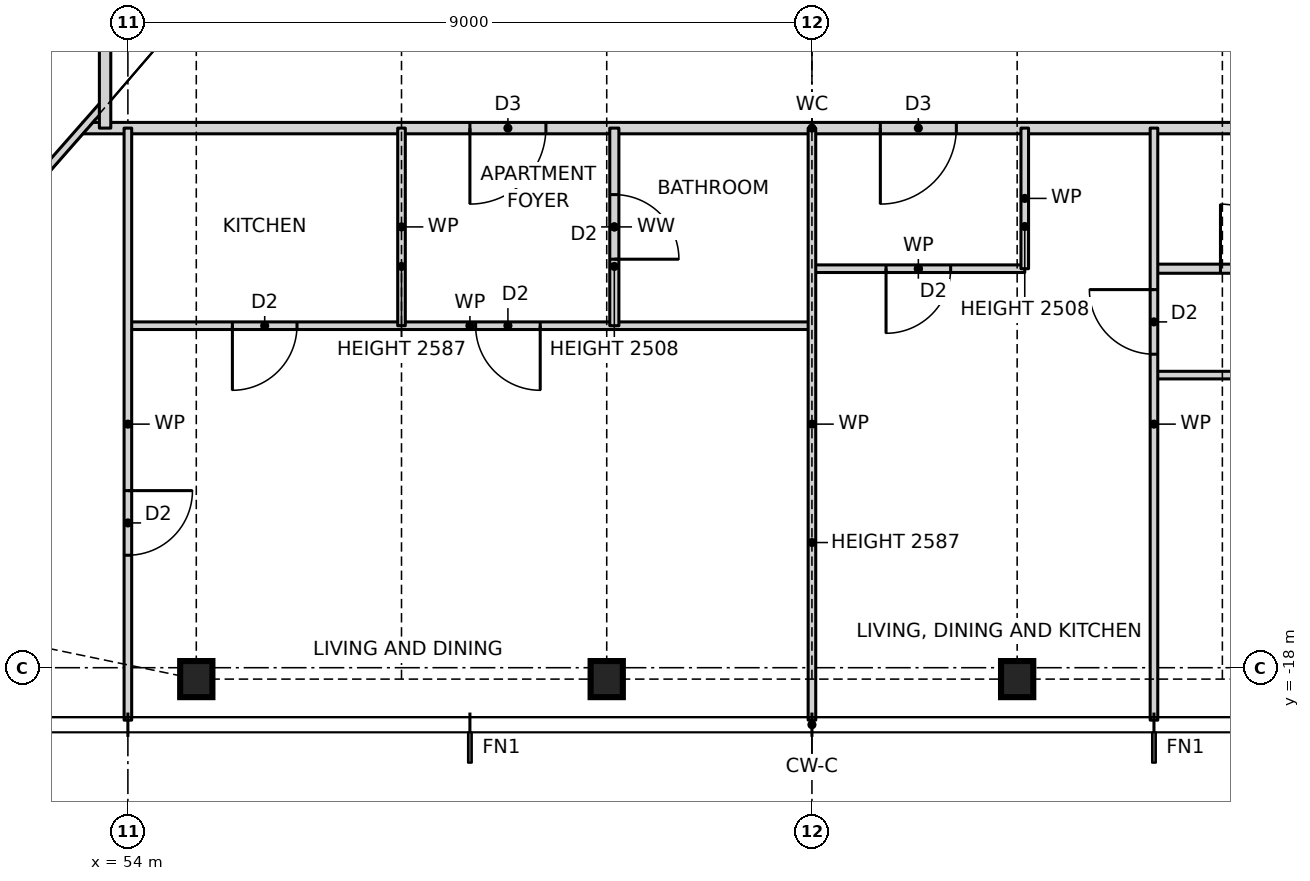
"""IFC4 building model, lengths in metres.
Left out: names, types, materials, properties, quantities, classifications, styles, units other than length and angle.
Written with IfcOpenShell. Run it as: python <this file> out.ifc"""

import sys

from ifc_helpers import new_model, si_unit, direction, frame, frame_2d, origin, origin_2d, place, context, subcontext, project, spatial, rectangle, i_section, extrude, element, fill, save


model = new_model("IFC4")
c1 = context("Model", 3, precision=1e-05, world=origin(), true_north=direction((0.0, 1.0)))
c2 = subcontext(c1, "Body", "Model", "MODEL_VIEW")
j1 = project(units=[si_unit("LENGTHUNIT", "METRE"), si_unit("PLANEANGLEUNIT", "RADIAN")], contexts=[c1])
p1 = place(None, origin())
s1 = spatial("IfcSite", under=j1, at=p1, CompositionType="ELEMENT")
p2 = place(p1, origin())
s2 = spatial("IfcBuilding", under=s1, at=p2, CompositionType="ELEMENT")
p3 = place(p2, frame((0.0, 0.0, 60.5)))
s3 = spatial("IfcBuildingStorey", under=s2, at=p3, CompositionType="ELEMENT", Elevation=60.5)
for number, where, z_axis, x_axis in (
    (1, (54.9, -18.15, 0.0), (0.0, 0.0, 1.0), (1.0, 0.0, 0.0)),
    (2, (60.3, -18.15, 0.0), (0.0, 0.0, 1.0), (1.0, 0.0, 0.0)),
    (3, (65.7, -18.15, 0.0), (0.0, 0.0, 1.0), (1.0, 0.0, 0.0)),
):
    element("IfcColumn", number, at=place(p3, frame(where, z_axis=z_axis, x_axis=x_axis)), inside=s3, PredefinedType="COLUMN", context=c2, shape_type="SweptSolid", body=[
        extrude(i_section(OverallWidth=0.424, OverallDepth=0.475, WebThickness=0.048, FlangeThickness=0.077, at=origin_2d()), origin(), (0.0, 0.0, 1.0), 3.5),
    ])
p4 = place(p3, frame((67.5, -14.15, 0.0), z_axis=(0.0, 0.0, 1.0), x_axis=(1.0, 0.0, 0.0)))
e4 = element("IfcWall", 4, at=p4, inside=s3, PredefinedType="PARTITIONING", context=c2, shape_type="SweptSolid", body=[
    extrude(rectangle(XDim=6.7, YDim=0.1, at=frame_2d((3.35, 0.0))), origin(), (0.0, 0.0, 1.0), 3.27),
])
p5 = place(p4, frame((1.825, 0.0, 0.0)))
e5 = element("IfcOpeningElement", 5, at=p5, cuts=e4, PredefinedType="OPENING", context=c2, shape_type="SweptSolid", body=[
    extrude(rectangle(XDim=0.85, YDim=2.1, at=frame_2d((0.425, 1.05))), frame((0.0, 0.06, 0.0), z_axis=(0.0, -1.0, 0.0), x_axis=(1.0, 0.0, 0.0)), (0.0, 0.0, 1.0), 0.12),
])
p6 = place(p4, frame((5.175, 0.0, 0.0)))
e6 = element("IfcOpeningElement", 6, at=p6, cuts=e4, PredefinedType="OPENING", context=c2, shape_type="SweptSolid", body=[
    extrude(rectangle(XDim=0.85, YDim=2.1, at=frame_2d((0.425, 1.05))), frame((0.0, 0.06, 0.0), z_axis=(0.0, -1.0, 0.0), x_axis=(1.0, 0.0, 0.0)), (0.0, 0.0, 1.0), 0.12),
])
p7 = place(p3, frame((54.0, -13.5, 0.0), z_axis=(0.0, 0.0, 1.0), x_axis=(1.0, 0.0, 0.0)))
e7 = element("IfcWall", 7, at=p7, inside=s3, PredefinedType="PARTITIONING", context=c2, shape_type="SweptSolid", body=[
    extrude(rectangle(XDim=9.0, YDim=0.1, at=frame_2d((4.5, 0.0))), origin(), (0.0, 0.0, 1.0), 3.27),
])
p8 = place(p7, frame((1.375, 0.0, 0.0)))
e8 = element("IfcOpeningElement", 8, at=p8, cuts=e7, PredefinedType="OPENING", context=c2, shape_type="SweptSolid", body=[
    extrude(rectangle(XDim=0.85, YDim=2.1, at=frame_2d((0.425, 1.05))), frame((0.0, 0.06, 0.0), z_axis=(0.0, -1.0, 0.0), x_axis=(1.0, 0.0, 0.0)), (0.0, 0.0, 1.0), 0.12),
])
p9 = place(p7, frame((4.575, 0.0, 0.0)))
e9 = element("IfcOpeningElement", 9, at=p9, cuts=e7, PredefinedType="OPENING", context=c2, shape_type="SweptSolid", body=[
    extrude(rectangle(XDim=0.85, YDim=2.1, at=frame_2d((0.425, 1.05))), frame((0.0, 0.06, 0.0), z_axis=(0.0, -1.0, 0.0), x_axis=(1.0, 0.0, 0.0)), (0.0, 0.0, 1.0), 0.12),
])
p10 = place(p3, frame((63.0, -12.75, 0.0), z_axis=(0.0, 0.0, 1.0), x_axis=(1.0, 0.0, 0.0)))
e10 = element("IfcWall", 10, at=p10, inside=s3, PredefinedType="PARTITIONING", context=c2, shape_type="SweptSolid", body=[
    extrude(rectangle(XDim=2.8, YDim=0.1, at=frame_2d((1.4, 0.0))), origin(), (0.0, 0.0, 1.0), 3.27),
])
p11 = place(p10, frame((0.975, 0.0, 0.0)))
e11 = element("IfcOpeningElement", 11, at=p11, cuts=e10, PredefinedType="OPENING", context=c2, shape_type="SweptSolid", body=[
    extrude(rectangle(XDim=0.85, YDim=2.1, at=frame_2d((0.425, 1.05))), frame((0.0, 0.06, 0.0), z_axis=(0.0, -1.0, 0.0), x_axis=(1.0, 0.0, 0.0)), (0.0, 0.0, 1.0), 0.12),
])
p12 = place(p3, frame((67.5, -12.75, 0.0), z_axis=(0.0, 0.0, 1.0), x_axis=(1.0, 0.0, 0.0)))
e12 = element("IfcWall", 12, at=p12, inside=s3, PredefinedType="PARTITIONING", context=c2, shape_type="SweptSolid", body=[
    extrude(rectangle(XDim=6.7, YDim=0.12, at=frame_2d((3.35, 0.0))), origin(), (0.0, 0.0, 1.0), 3.27),
])
p13 = place(p12, frame((0.875, 0.0, 0.0)))
e13 = element("IfcOpeningElement", 13, at=p13, cuts=e12, PredefinedType="OPENING", context=c2, shape_type="SweptSolid", body=[
    extrude(rectangle(XDim=0.85, YDim=2.1, at=frame_2d((0.425, 1.05))), frame((0.0, 0.07, 0.0), z_axis=(0.0, -1.0, 0.0), x_axis=(1.0, 0.0, 0.0)), (0.0, 0.0, 1.0), 0.14),
])
p14 = place(p12, frame((4.225, 0.0, 0.0)))
e14 = element("IfcOpeningElement", 14, at=p14, cuts=e12, PredefinedType="OPENING", context=c2, shape_type="SweptSolid", body=[
    extrude(rectangle(XDim=0.85, YDim=2.1, at=frame_2d((0.425, 1.05))), frame((0.0, 0.07, 0.0), z_axis=(0.0, -1.0, 0.0), x_axis=(1.0, 0.0, 0.0)), (0.0, 0.0, 1.0), 0.14),
])
p15 = place(p3, frame((53.408, -10.9, 0.0), z_axis=(0.0, 0.0, 1.0), x_axis=(1.0, 0.0, 0.0)))
e15 = element("IfcWall", 15, at=p15, inside=s3, PredefinedType="PARTITIONING", context=c2, shape_type="SweptSolid", body=[
    extrude(rectangle(XDim=19.184, YDim=0.15, at=frame_2d((9.592, 0.0))), origin(), (0.0, 0.0, 1.0), 3.27),
])
p16 = place(p15, frame((5.092, 0.0, 0.0)))
e16 = element("IfcOpeningElement", 16, at=p16, cuts=e15, PredefinedType="OPENING", context=c2, shape_type="SweptSolid", body=[
    extrude(rectangle(XDim=1.0, YDim=2.1, at=frame_2d((0.5, 1.05))), frame((0.0, 0.085, 0.0), z_axis=(0.0, -1.0, 0.0), x_axis=(1.0, 0.0, 0.0)), (0.0, 0.0, 1.0), 0.17),
])
p17 = place(p15, frame((10.492, 0.0, 0.0)))
e17 = element("IfcOpeningElement", 17, at=p17, cuts=e15, PredefinedType="OPENING", context=c2, shape_type="SweptSolid", body=[
    extrude(rectangle(XDim=1.0, YDim=2.1, at=frame_2d((0.5, 1.05))), frame((0.0, 0.085, 0.0), z_axis=(0.0, -1.0, 0.0), x_axis=(1.0, 0.0, 0.0)), (0.0, 0.0, 1.0), 0.17),
])
p18 = place(p3, frame((47.944, -17.109, 0.0), z_axis=(0.0, 0.0, 1.0), x_axis=(0.660612734851, 0.750726857487, 0.0)))
e18 = element("IfcWall", 18, at=p18, inside=s3, PredefinedType="PARTITIONING", context=c2, shape_type="SweptSolid", body=[
    extrude(rectangle(XDim=8.713, YDim=0.1, at=frame_2d((4.356, 0.0))), origin(), (0.0, 0.0, 1.0), 2.429),
])
p19 = place(p3, frame((67.5, -18.69, 0.0), z_axis=(0.0, 0.0, 1.0), x_axis=(0.0, 1.0, 0.0)))
e19 = element("IfcWall", 19, at=p19, inside=s3, PredefinedType="PARTITIONING", context=c2, shape_type="SweptSolid", body=[
    extrude(rectangle(XDim=7.79, YDim=0.1, at=frame_2d((3.895, 0.0))), origin(), (0.0, 0.0, 1.0), 3.27),
])
p20 = place(p19, frame((4.815, 0.0, 0.0)))
e20 = element("IfcOpeningElement", 20, at=p20, cuts=e19, PredefinedType="OPENING", context=c2, shape_type="SweptSolid", body=[
    extrude(rectangle(XDim=0.85, YDim=2.1, at=frame_2d((0.425, 1.05))), frame((0.0, 0.06, 0.0), z_axis=(0.0, -1.0, 0.0), x_axis=(1.0, 0.0, 0.0)), (0.0, 0.0, 1.0), 0.12),
])
p21 = place(p3, frame((65.8, -12.75, 0.0), z_axis=(0.0, 0.0, 1.0), x_axis=(0.0, 1.0, 0.0)))
e21 = element("IfcWall", 21, at=p21, inside=s3, PredefinedType="PARTITIONING", context=c2, shape_type="SweptSolid", body=[
    extrude(rectangle(XDim=1.85, YDim=0.1, at=frame_2d((0.925, 0.0))), origin(), (0.0, 0.0, 1.0), 2.508),
])
p22 = place(p3, frame((63.0, -18.69, 0.0), z_axis=(0.0, 0.0, 1.0), x_axis=(0.0, 1.0, 0.0)))
e22 = element("IfcWall", 22, at=p22, inside=s3, PredefinedType="PARTITIONING", context=c2, shape_type="SweptSolid", body=[
    extrude(rectangle(XDim=7.79, YDim=0.1, at=frame_2d((3.895, 0.0))), origin(), (0.0, 0.0, 1.0), 2.587),
])
p23 = place(p3, frame((60.4, -13.5, 0.0), z_axis=(0.0, 0.0, 1.0), x_axis=(0.0, 1.0, 0.0)))
e23 = element("IfcWall", 23, at=p23, inside=s3, PredefinedType="PARTITIONING", context=c2, shape_type="SweptSolid", body=[
    extrude(rectangle(XDim=2.6, YDim=0.12, at=frame_2d((1.3, 0.0))), origin(), (0.0, 0.0, 1.0), 2.508),
])
p24 = place(p23, frame((0.875, 0.0, 0.0)))
e24 = element("IfcOpeningElement", 24, at=p24, cuts=e23, PredefinedType="OPENING", context=c2, shape_type="SweptSolid", body=[
    extrude(rectangle(XDim=0.85, YDim=2.1, at=frame_2d((0.425, 1.05))), frame((0.0, 0.07, 0.0), z_axis=(0.0, -1.0, 0.0), x_axis=(1.0, 0.0, 0.0)), (0.0, 0.0, 1.0), 0.14),
])
p25 = place(p3, frame((57.6, -13.5, 0.0), z_axis=(0.0, 0.0, 1.0), x_axis=(0.0, 1.0, 0.0)))
e25 = element("IfcWall", 25, at=p25, inside=s3, PredefinedType="PARTITIONING", context=c2, shape_type="SweptSolid", body=[
    extrude(rectangle(XDim=2.6, YDim=0.1, at=frame_2d((1.3, 0.0))), origin(), (0.0, 0.0, 1.0), 2.587),
])
p26 = place(p3, frame((54.0, -18.69, 0.0), z_axis=(0.0, 0.0, 1.0), x_axis=(0.0, 1.0, 0.0)))
e26 = element("IfcWall", 26, at=p26, inside=s3, PredefinedType="PARTITIONING", context=c2, shape_type="SweptSolid", body=[
    extrude(rectangle(XDim=7.79, YDim=0.1, at=frame_2d((3.895, 0.0))), origin(), (0.0, 0.0, 1.0), 3.27),
])
p27 = place(p26, frame((2.17, 0.0, 0.0)))
e27 = element("IfcOpeningElement", 27, at=p27, cuts=e26, PredefinedType="OPENING", context=c2, shape_type="SweptSolid", body=[
    extrude(rectangle(XDim=0.85, YDim=2.1, at=frame_2d((0.425, 1.05))), frame((0.0, 0.06, 0.0), z_axis=(0.0, -1.0, 0.0), x_axis=(1.0, 0.0, 0.0)), (0.0, 0.0, 1.0), 0.12),
])
p28 = place(p3, frame((53.7, -10.9, 0.0), z_axis=(0.0, 0.0, 1.0), x_axis=(0.0, 1.0, 0.0)))
e28 = element("IfcWall", 28, at=p28, inside=s3, PredefinedType="PARTITIONING", context=c2, shape_type="SweptSolid", body=[
    extrude(rectangle(XDim=21.468, YDim=0.15, at=frame_2d((10.734, 0.0))), origin(), (0.0, 0.0, 1.0), 3.27),
])
p29 = place(p28, frame((16.65, 0.0, 0.0)))
e29 = element("IfcOpeningElement", 29, at=p29, cuts=e28, PredefinedType="OPENING", context=c2, shape_type="SweptSolid", body=[
    extrude(rectangle(XDim=1.0, YDim=2.1, at=frame_2d((0.5, 1.05))), frame((0.0, 0.085, 0.0), z_axis=(0.0, -1.0, 0.0), x_axis=(1.0, 0.0, 0.0)), (0.0, 0.0, 1.0), 0.17),
])
p30 = place(p28, frame((11.25, 0.0, 0.0)))
e30 = element("IfcOpeningElement", 30, at=p30, cuts=e28, PredefinedType="OPENING", context=c2, shape_type="SweptSolid", body=[
    extrude(rectangle(XDim=1.0, YDim=2.1, at=frame_2d((0.5, 1.05))), frame((0.0, 0.085, 0.0), z_axis=(0.0, -1.0, 0.0), x_axis=(1.0, 0.0, 0.0)), (0.0, 0.0, 1.0), 0.17),
])
p31 = place(p8, frame((0.85, 0.0, 0.0), z_axis=(0.0, 0.0, 1.0), x_axis=(-1.0, 0.0, 0.0)))
e31 = element("IfcDoor", 31, at=p31, inside=s3, OperationType="SINGLE_SWING_RIGHT", PredefinedType="DOOR", context=c2, shape_type="SweptSolid", body=[
    extrude(rectangle(XDim=0.85, YDim=2.1, at=frame_2d((0.425, 1.05))), frame((0.0, 0.025, 0.0), z_axis=(0.0, -1.0, 0.0), x_axis=(1.0, 0.0, 0.0)), (0.0, 0.0, 1.0), 0.05),
])
fill(e8, e31)
p32 = place(p16, frame((1.0, 0.0, 0.0), z_axis=(0.0, 0.0, 1.0), x_axis=(-1.0, 0.0, 0.0)))
e32 = element("IfcDoor", 32, at=p32, inside=s3, OperationType="SINGLE_SWING_RIGHT", PredefinedType="DOOR", context=c2, shape_type="SweptSolid", body=[
    extrude(rectangle(XDim=1.0, YDim=2.1, at=frame_2d((0.5, 1.05))), frame((0.0, 0.025, 0.0), z_axis=(0.0, -1.0, 0.0), x_axis=(1.0, 0.0, 0.0)), (0.0, 0.0, 1.0), 0.05),
])
fill(e16, e32)
p33 = place(p9, frame((0.85, 0.0, 0.0), z_axis=(0.0, 0.0, 1.0), x_axis=(-1.0, 0.0, 0.0)))
e33 = element("IfcDoor", 33, at=p33, inside=s3, OperationType="SINGLE_SWING_LEFT", PredefinedType="DOOR", context=c2, shape_type="SweptSolid", body=[
    extrude(rectangle(XDim=0.85, YDim=2.1, at=frame_2d((0.425, 1.05))), frame((0.0, 0.025, 0.0), z_axis=(0.0, -1.0, 0.0), x_axis=(1.0, 0.0, 0.0)), (0.0, 0.0, 1.0), 0.05),
])
fill(e9, e33)
p34 = place(p24, frame((0.85, 0.0, 0.0), z_axis=(0.0, 0.0, 1.0), x_axis=(-1.0, 0.0, 0.0)))
e34 = element("IfcDoor", 34, at=p34, inside=s3, OperationType="SINGLE_SWING_RIGHT", PredefinedType="DOOR", context=c2, shape_type="SweptSolid", body=[
    extrude(rectangle(XDim=0.85, YDim=2.1, at=frame_2d((0.425, 1.05))), frame((0.0, 0.025, 0.0), z_axis=(0.0, -1.0, 0.0), x_axis=(1.0, 0.0, 0.0)), (0.0, 0.0, 1.0), 0.05),
])
fill(e24, e34)
p35 = place(p27, frame((0.85, 0.0, 0.0), z_axis=(0.0, 0.0, 1.0), x_axis=(-1.0, 0.0, 0.0)))
e35 = element("IfcDoor", 35, at=p35, inside=s3, OperationType="SINGLE_SWING_LEFT", PredefinedType="DOOR", context=c2, shape_type="SweptSolid", body=[
    extrude(rectangle(XDim=0.85, YDim=2.1, at=frame_2d((0.425, 1.05))), frame((0.0, 0.025, 0.0), z_axis=(0.0, -1.0, 0.0), x_axis=(1.0, 0.0, 0.0)), (0.0, 0.0, 1.0), 0.05),
])
fill(e27, e35)
p36 = place(p17, frame((1.0, 0.0, 0.0), z_axis=(0.0, 0.0, 1.0), x_axis=(-1.0, 0.0, 0.0)))
e36 = element("IfcDoor", 36, at=p36, inside=s3, OperationType="SINGLE_SWING_RIGHT", PredefinedType="DOOR", context=c2, shape_type="SweptSolid", body=[
    extrude(rectangle(XDim=1.0, YDim=2.1, at=frame_2d((0.5, 1.05))), frame((0.0, 0.025, 0.0), z_axis=(0.0, -1.0, 0.0), x_axis=(1.0, 0.0, 0.0)), (0.0, 0.0, 1.0), 0.05),
])
fill(e17, e36)
p37 = place(p11, frame((0.85, 0.0, 0.0), z_axis=(0.0, 0.0, 1.0), x_axis=(-1.0, 0.0, 0.0)))
e37 = element("IfcDoor", 37, at=p37, inside=s3, OperationType="SINGLE_SWING_RIGHT", PredefinedType="DOOR", context=c2, shape_type="SweptSolid", body=[
    extrude(rectangle(XDim=0.85, YDim=2.1, at=frame_2d((0.425, 1.05))), frame((0.0, 0.025, 0.0), z_axis=(0.0, -1.0, 0.0), x_axis=(1.0, 0.0, 0.0)), (0.0, 0.0, 1.0), 0.05),
])
fill(e11, e37)
p38 = place(p20, origin())
e38 = element("IfcDoor", 38, at=p38, inside=s3, OperationType="SINGLE_SWING_RIGHT", PredefinedType="DOOR", context=c2, shape_type="SweptSolid", body=[
    extrude(rectangle(XDim=0.85, YDim=2.1, at=frame_2d((0.425, 1.05))), frame((0.0, 0.025, 0.0), z_axis=(0.0, -1.0, 0.0), x_axis=(1.0, 0.0, 0.0)), (0.0, 0.0, 1.0), 0.05),
])
fill(e20, e38)
p39 = place(p13, origin())
e39 = element("IfcDoor", 39, at=p39, inside=s3, OperationType="SINGLE_SWING_LEFT", PredefinedType="DOOR", context=c2, shape_type="SweptSolid", body=[
    extrude(rectangle(XDim=0.85, YDim=2.1, at=frame_2d((0.425, 1.05))), frame((0.0, 0.025, 0.0), z_axis=(0.0, -1.0, 0.0), x_axis=(1.0, 0.0, 0.0)), (0.0, 0.0, 1.0), 0.05),
])
fill(e13, e39)
save(model, sys.argv[1])
